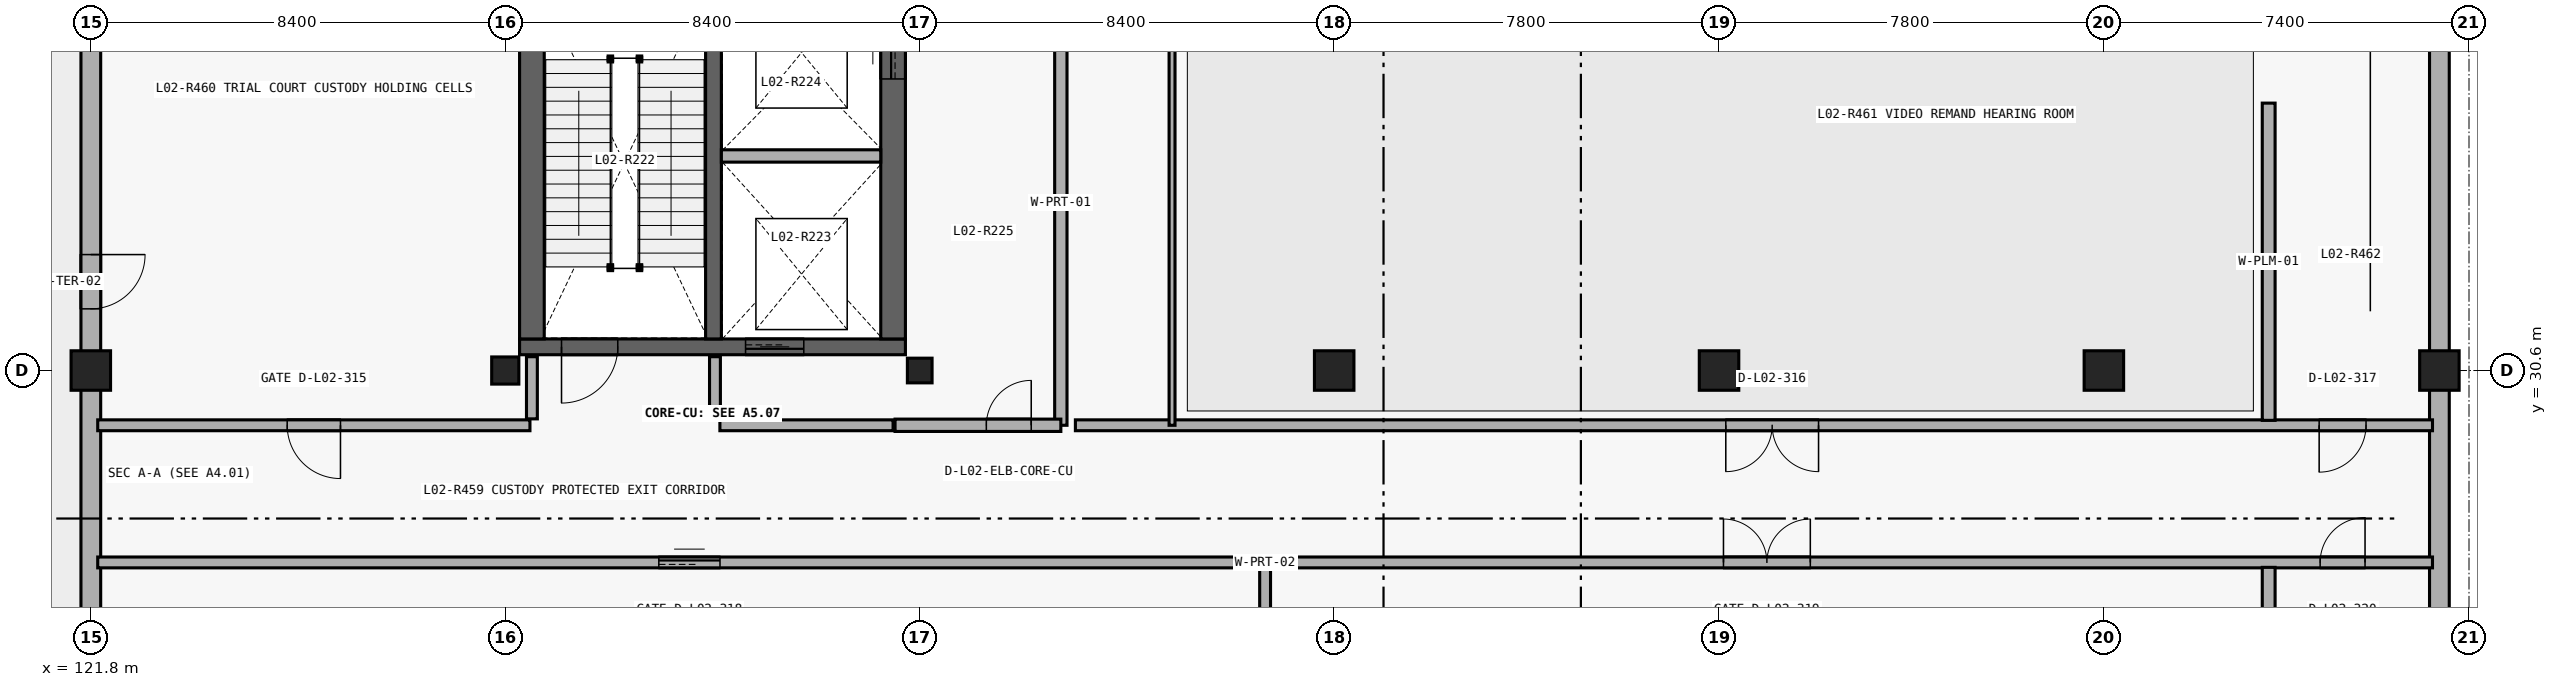
"""IFC4 building model, lengths in metres.
Left out: names, types, materials, properties, quantities, classifications, styles, units other than length and angle.
Written with IfcOpenShell. Run it as: python <this file> out.ifc"""

import sys

from ifc_helpers import new_model, si_unit, direction, frame, frame_2d, origin_with_axes, origin_2d_with_axis, place, context, subcontext, project, spatial, rectangle, circle, i_section, extrude, element, fill, save


model = new_model("IFC4")
c1 = context("Model", 3, precision=1e-05, world=origin_with_axes(), true_north=direction((0.0, 1.0)))
c2 = subcontext(c1, "Body", "Model", "MODEL_VIEW")
j1 = project(units=[si_unit("LENGTHUNIT", "METRE"), si_unit("PLANEANGLEUNIT", "RADIAN")], contexts=[c1])
p1 = place(None, origin_with_axes())
s1 = spatial("IfcSite", under=j1, at=p1, CompositionType="ELEMENT")
p2 = place(p1, origin_with_axes())
s2 = spatial("IfcBuilding", under=s1, at=p2, CompositionType="ELEMENT")
p3 = place(p2, frame((0.0, 0.0, 10.8), z_axis=(0.0, 0.0, 1.0), x_axis=(1.0, 0.0, 0.0)))
s3 = spatial("IfcBuildingStorey", under=s2, at=p3, CompositionType="ELEMENT", Elevation=10.8)
p4 = place(None, frame((169.4, 7.06, 10.8), z_axis=(0.0, 0.0, 1.0), x_axis=(0.0, 1.0, 0.0)))
e1 = element("IfcWall", 1, at=p4, inside=s3, PredefinedType="SOLIDWALL", context=c2, shape_type="SweptSolid", body=[
    extrude(rectangle(XDim=47.28, YDim=0.4, at=frame_2d((23.64, 0.0), x_axis=(1.0, 0.0))), origin_with_axes(), (0.0, 0.0, 1.0), 4.124),
])
p5 = place(None, frame((121.8, 54.34, 10.8), z_axis=(0.0, 0.0, 1.0), x_axis=(0.0, -1.0, 0.0)))
e2 = element("IfcWall", 2, at=p5, inside=s3, PredefinedType="SOLIDWALL", context=c2, shape_type="SweptSolid", body=[
    extrude(rectangle(XDim=47.28, YDim=0.4, at=frame_2d((23.64, 0.0), x_axis=(1.0, 0.0))), origin_with_axes(), (0.0, 0.0, 1.0), 4.124),
])
p6 = place(None, frame((121.8, 32.4, 10.8), z_axis=(0.0, 0.0, 1.0), x_axis=(0.0, -1.0, 0.0)))
e3 = element("IfcOpeningElement", 3, at=p6, cuts=e2, PredefinedType="OPENING", context=c2, shape_type="SweptSolid", body=[
    extrude(rectangle(XDim=1.1, YDim=2.3, at=frame_2d((0.0, 1.15), x_axis=(1.0, 0.0))), frame((0.0, 0.21, 0.0), z_axis=(0.0, -1.0, 0.0), x_axis=(1.0, 0.0, 0.0)), (0.0, 0.0, 1.0), 0.42),
])
p7 = place(None, frame((130.49, 31.08, 10.8), z_axis=(0.0, 0.0, 1.0), x_axis=(1.0, 0.0, 0.0)))
e4 = element("IfcWall", 4, at=p7, inside=s3, PredefinedType="SHEAR", context=c2, shape_type="SweptSolid", body=[
    extrude(rectangle(XDim=7.82, YDim=0.32, at=frame_2d((3.91, 0.0), x_axis=(1.0, 0.0))), origin_with_axes(), (0.0, 0.0, 1.0), 4.8),
])
p8 = place(None, frame((131.91, 31.08, 10.8), z_axis=(0.0, 0.0, 1.0), x_axis=(1.0, 0.0, 0.0)))
e5 = element("IfcOpeningElement", 5, at=p8, cuts=e4, PredefinedType="OPENING", context=c2, shape_type="SweptSolid", body=[
    extrude(rectangle(XDim=1.14, YDim=2.18, at=frame_2d((0.0, 1.09), x_axis=(1.0, 0.0))), frame((0.0, 0.17, 0.0), z_axis=(0.0, -1.0, 0.0), x_axis=(1.0, 0.0, 0.0)), (0.0, 0.0, 1.0), 0.34),
])
p9 = place(None, frame((135.66, 31.08, 10.8), z_axis=(0.0, 0.0, 1.0), x_axis=(1.0, 0.0, 0.0)))
e6 = element("IfcOpeningElement", 6, at=p9, cuts=e4, PredefinedType="OPENING", context=c2, shape_type="SweptSolid", body=[
    extrude(rectangle(XDim=1.18, YDim=2.24, at=frame_2d((0.0, 1.12), x_axis=(1.0, 0.0))), frame((0.0, 0.17, 0.0), z_axis=(0.0, -1.0, 0.0), x_axis=(1.0, 0.0, 0.0)), (0.0, 0.0, 1.0), 0.34),
])
p10 = place(None, frame((138.06, 31.24, 10.8), z_axis=(0.0, 0.0, 1.0), x_axis=(0.0, 1.0, 0.0)))
e7 = element("IfcWall", 7, at=p10, inside=s3, PredefinedType="SHEAR", context=c2, shape_type="SweptSolid", body=[
    extrude(rectangle(XDim=7.12, YDim=0.5, at=frame_2d((3.56, 0.0), x_axis=(1.0, 0.0))), origin_with_axes(), (0.0, 0.0, 1.0), 4.8),
])
p11 = place(None, frame((138.06, 37.1, 10.8), z_axis=(0.0, 0.0, 1.0), x_axis=(0.0, 1.0, 0.0)))
e8 = element("IfcOpeningElement", 8, at=p11, cuts=e7, PredefinedType="OPENING", context=c2, shape_type="SweptSolid", body=[
    extrude(rectangle(XDim=1.18, YDim=2.24, at=frame_2d((0.0, 1.12), x_axis=(1.0, 0.0))), frame((0.0, 0.26, 0.0), z_axis=(0.0, -1.0, 0.0), x_axis=(1.0, 0.0, 0.0)), (0.0, 0.0, 1.0), 0.52),
])
p12 = place(None, frame((130.74, 38.36, 10.8), z_axis=(0.0, 0.0, 1.0), x_axis=(0.0, -1.0, 0.0)))
e9 = element("IfcWall", 9, at=p12, inside=s3, PredefinedType="SHEAR", context=c2, shape_type="SweptSolid", body=[
    extrude(rectangle(XDim=7.12, YDim=0.5, at=frame_2d((3.56, 0.0), x_axis=(1.0, 0.0))), origin_with_axes(), (0.0, 0.0, 1.0), 4.8),
])
p13 = place(None, frame((134.42, 31.24, 10.8), z_axis=(0.0, 0.0, 1.0), x_axis=(0.0, 1.0, 0.0)))
e10 = element("IfcWall", 10, at=p13, inside=s3, PredefinedType="SHEAR", context=c2, shape_type="SweptSolid", body=[
    extrude(rectangle(XDim=7.12, YDim=0.32, at=frame_2d((3.56, 0.0), x_axis=(1.0, 0.0))), origin_with_axes(), (0.0, 0.0, 1.0), 4.8),
])
p14 = place(None, frame((134.58, 34.949, 10.8), z_axis=(0.0, 0.0, 1.0), x_axis=(1.0, 0.0, 0.0)))
e11 = element("IfcWall", 11, at=p14, inside=s3, PredefinedType="PARTITIONING", context=c2, shape_type="SweptSolid", body=[
    extrude(rectangle(XDim=3.23, YDim=0.25, at=frame_2d((1.615, 0.0), x_axis=(1.0, 0.0))), origin_with_axes(), (0.0, 0.0, 1.0), 4.44),
])
p15 = place(None, frame((141.46, 29.49, 10.8), z_axis=(0.0, 0.0, 1.0), x_axis=(0.0, 1.0, 0.0)))
e12 = element("IfcWall", 12, at=p15, inside=s3, PredefinedType="PARTITIONING", context=c2, shape_type="SweptSolid", body=[
    extrude(rectangle(XDim=9.03, YDim=0.25, at=frame_2d((4.515, 0.0), x_axis=(1.0, 0.0))), origin_with_axes(), (0.0, 0.0, 1.0), 4.44),
])
p16 = place(None, frame((138.1, 29.49, 10.8), z_axis=(0.0, 0.0, 1.0), x_axis=(1.0, 0.0, 0.0)))
e13 = element("IfcWall", 13, at=p16, inside=s3, PredefinedType="PARTITIONING", context=c2, shape_type="SweptSolid", body=[
    extrude(rectangle(XDim=3.36, YDim=0.25, at=frame_2d((1.68, 0.0), x_axis=(1.0, 0.0))), origin_with_axes(), (0.0, 0.0, 1.0), 4.44),
])
p17 = place(None, frame((140.405, 29.49, 10.8), z_axis=(0.0, 0.0, 1.0), x_axis=(1.0, 0.0, 0.0)))
e14 = element("IfcOpeningElement", 14, at=p17, cuts=e13, PredefinedType="OPENING", context=c2, shape_type="SweptSolid", body=[
    extrude(rectangle(XDim=0.91, YDim=2.12, at=frame_2d((0.0, 1.06), x_axis=(1.0, 0.0))), frame((0.0, 0.135, 0.0), z_axis=(0.0, -1.0, 0.0), x_axis=(1.0, 0.0, 0.0)), (0.0, 0.0, 1.0), 0.27),
])
for number, where, z_axis, x_axis in (
    (15, (130.74, 29.62, 10.8), (0.0, 0.0, 1.0), (0.0, 1.0, 0.0)),
    (16, (134.45, 29.62, 10.8), (0.0, 0.0, 1.0), (0.0, 1.0, 0.0)),
):
    element("IfcWall", number, at=place(None, frame(where, z_axis=z_axis, x_axis=x_axis)), inside=s3, PredefinedType="PARTITIONING", context=c2, shape_type="SweptSolid", body=[
        extrude(rectangle(XDim=1.26, YDim=0.22, at=frame_2d((0.63, 0.0), x_axis=(1.0, 0.0))), origin_with_axes(), (0.0, 0.0, 1.0), 4.44),
    ])
p18 = place(None, frame((121.94, 29.49, 10.8), z_axis=(0.0, 0.0, 1.0), x_axis=(1.0, 0.0, 0.0)))
e17 = element("IfcWall", 17, at=p18, inside=s3, PredefinedType="PARTITIONING", context=c2, shape_type="SweptSolid", body=[
    extrude(rectangle(XDim=8.76, YDim=0.22, at=frame_2d((4.38, 0.0), x_axis=(1.0, 0.0))), origin_with_axes(), (0.0, 0.0, 1.0), 4.44),
])
p19 = place(None, frame((126.32, 29.49, 10.8), z_axis=(0.0, 0.0, 1.0), x_axis=(1.0, 0.0, 0.0)))
e18 = element("IfcOpeningElement", 18, at=p19, cuts=e17, PredefinedType="OPENING", context=c2, shape_type="SweptSolid", body=[
    extrude(rectangle(XDim=1.08, YDim=2.18, at=frame_2d((0.0, 1.09), x_axis=(1.0, 0.0))), frame((0.0, 0.12, 0.0), z_axis=(0.0, -1.0, 0.0), x_axis=(1.0, 0.0, 0.0)), (0.0, 0.0, 1.0), 0.24),
])
p20 = place(None, frame((134.55, 29.49, 10.8), z_axis=(0.0, 0.0, 1.0), x_axis=(1.0, 0.0, 0.0)))
e19 = element("IfcWall", 19, at=p20, inside=s3, PredefinedType="PARTITIONING", context=c2, shape_type="SweptSolid", body=[
    extrude(rectangle(XDim=3.51, YDim=0.22, at=frame_2d((1.755, 0.0), x_axis=(1.0, 0.0))), origin_with_axes(), (0.0, 0.0, 1.0), 4.44),
])
p21 = place(None, frame((141.755, 29.49, 10.8), z_axis=(0.0, 0.0, 1.0), x_axis=(1.0, 0.0, 0.0)))
e20 = element("IfcWall", 20, at=p21, inside=s3, PredefinedType="PARTITIONING", context=c2, shape_type="SweptSolid", body=[
    extrude(rectangle(XDim=27.505, YDim=0.22, at=frame_2d((13.752, 0.0), x_axis=(1.0, 0.0))), origin_with_axes(), (0.0, 0.0, 1.0), 4.44),
])
p22 = place(None, frame((155.877, 29.49, 10.8), z_axis=(0.0, 0.0, 1.0), x_axis=(1.0, 0.0, 0.0)))
e21 = element("IfcOpeningElement", 21, at=p22, cuts=e20, PredefinedType="OPENING", context=c2, shape_type="SweptSolid", body=[
    extrude(rectangle(XDim=1.88, YDim=2.56, at=frame_2d((0.0, 1.28), x_axis=(1.0, 0.0))), frame((0.0, 0.12, 0.0), z_axis=(0.0, -1.0, 0.0), x_axis=(1.0, 0.0, 0.0)), (0.0, 0.0, 1.0), 0.24),
])
p23 = place(None, frame((167.438, 29.49, 10.8), z_axis=(0.0, 0.0, 1.0), x_axis=(1.0, 0.0, 0.0)))
e22 = element("IfcOpeningElement", 22, at=p23, cuts=e20, PredefinedType="OPENING", context=c2, shape_type="SweptSolid", body=[
    extrude(rectangle(XDim=0.95, YDim=2.1, at=frame_2d((0.0, 1.05), x_axis=(1.0, 0.0))), frame((0.0, 0.12, 0.0), z_axis=(0.0, -1.0, 0.0), x_axis=(1.0, 0.0, 0.0)), (0.0, 0.0, 1.0), 0.24),
])
p24 = place(None, frame((121.94, 26.71, 10.8), z_axis=(0.0, 0.0, 1.0), x_axis=(1.0, 0.0, 0.0)))
e23 = element("IfcWall", 23, at=p24, inside=s3, PredefinedType="PARTITIONING", context=c2, shape_type="SweptSolid", body=[
    extrude(rectangle(XDim=47.32, YDim=0.22, at=frame_2d((23.66, 0.0), x_axis=(1.0, 0.0))), origin_with_axes(), (0.0, 0.0, 1.0), 4.44),
])
p25 = place(None, frame((133.932, 26.71, 10.8), z_axis=(0.0, 0.0, 1.0), x_axis=(1.0, 0.0, 0.0)))
e24 = element("IfcOpeningElement", 24, at=p25, cuts=e23, PredefinedType="OPENING", context=c2, shape_type="SweptSolid", body=[
    extrude(rectangle(XDim=1.24, YDim=2.22, at=frame_2d((0.0, 1.11), x_axis=(1.0, 0.0))), frame((0.0, 0.12, 0.0), z_axis=(0.0, -1.0, 0.0), x_axis=(1.0, 0.0, 0.0)), (0.0, 0.0, 1.0), 0.24),
])
p26 = place(None, frame((155.77, 26.71, 10.8), z_axis=(0.0, 0.0, 1.0), x_axis=(1.0, 0.0, 0.0)))
e25 = element("IfcOpeningElement", 25, at=p26, cuts=e23, PredefinedType="OPENING", context=c2, shape_type="SweptSolid", body=[
    extrude(rectangle(XDim=1.76, YDim=2.26, at=frame_2d((0.0, 1.13), x_axis=(1.0, 0.0))), frame((0.0, 0.12, 0.0), z_axis=(0.0, -1.0, 0.0), x_axis=(1.0, 0.0, 0.0)), (0.0, 0.0, 1.0), 0.24),
])
p27 = place(None, frame((167.438, 26.71, 10.8), z_axis=(0.0, 0.0, 1.0), x_axis=(1.0, 0.0, 0.0)))
e26 = element("IfcOpeningElement", 26, at=p27, cuts=e23, PredefinedType="OPENING", context=c2, shape_type="SweptSolid", body=[
    extrude(rectangle(XDim=0.91, YDim=2.12, at=frame_2d((0.0, 1.06), x_axis=(1.0, 0.0))), frame((0.0, 0.12, 0.0), z_axis=(0.0, -1.0, 0.0), x_axis=(1.0, 0.0, 0.0)), (0.0, 0.0, 1.0), 0.24),
])
p28 = place(None, frame((165.94, 29.59, 10.8), z_axis=(0.0, 0.0, 1.0), x_axis=(0.0, 1.0, 0.0)))
e27 = element("IfcWall", 27, at=p28, inside=s3, PredefinedType="PLUMBINGWALL", context=c2, shape_type="SweptSolid", body=[
    extrude(rectangle(XDim=6.43, YDim=0.26, at=frame_2d((3.215, 0.0), x_axis=(1.0, 0.0))), origin_with_axes(), (0.0, 0.0, 1.0), 4.44),
])
p29 = place(None, frame((165.94, 20.18, 10.8), z_axis=(0.0, 0.0, 1.0), x_axis=(0.0, 1.0, 0.0)))
e28 = element("IfcWall", 28, at=p29, inside=s3, PredefinedType="PLUMBINGWALL", context=c2, shape_type="SweptSolid", body=[
    extrude(rectangle(XDim=6.43, YDim=0.26, at=frame_2d((3.215, 0.0), x_axis=(1.0, 0.0))), origin_with_axes(), (0.0, 0.0, 1.0), 4.44),
])
p30 = place(None, frame((143.714, 29.49, 10.8), z_axis=(0.0, 0.0, 1.0), x_axis=(0.0, 1.0, 0.0)))
e29 = element("IfcWall", 29, at=p30, inside=s3, PredefinedType="PARTITIONING", context=c2, shape_type="SweptSolid", body=[
    extrude(rectangle(XDim=24.97, YDim=0.12, at=frame_2d((12.485, 0.0), x_axis=(1.0, 0.0))), origin_with_axes(), (0.0, 0.0, 1.0), 4.44),
])
p31 = place(None, frame((145.6, 6.94, 10.8), z_axis=(0.0, 0.0, 1.0), x_axis=(0.0, 1.0, 0.0)))
e30 = element("IfcWall", 30, at=p31, inside=s3, PredefinedType="PARTITIONING", context=c2, shape_type="SweptSolid", body=[
    extrude(rectangle(XDim=19.77, YDim=0.22, at=frame_2d((9.885, 0.0), x_axis=(1.0, 0.0))), origin_with_axes(), (0.0, 0.0, 1.0), 4.44),
])
p32 = place(None, frame((121.8, 30.6, 10.8), z_axis=(0.0, 0.0, 1.0), x_axis=(1.0, 0.0, 0.0)))
e31 = element("IfcColumn", 31, at=p32, inside=s3, PredefinedType="COLUMN", context=c2, shape_type="SweptSolid", body=[
    extrude(circle(Radius=0.4, at=origin_2d_with_axis()), origin_with_axes(), (0.0, 0.0, 1.0), 4.8),
])
p33 = place(None, frame((130.2, 30.6, 10.8), z_axis=(0.0, 0.0, 1.0), x_axis=(1.0, 0.0, 0.0)))
e32 = element("IfcColumn", 32, at=p33, inside=s3, PredefinedType="COLUMN", context=c2, shape_type="SweptSolid", body=[
    extrude(i_section(OverallWidth=0.55, OverallDepth=0.55, WebThickness=0.025, FlangeThickness=0.042, at=origin_2d_with_axis()), origin_with_axes(), (0.0, 0.0, 1.0), 4.8),
])
p34 = place(None, frame((138.6, 30.6, 10.8), z_axis=(0.0, 0.0, 1.0), x_axis=(1.0, 0.0, 0.0)))
e33 = element("IfcColumn", 33, at=p34, inside=s3, PredefinedType="COLUMN", context=c2, shape_type="SweptSolid", body=[
    extrude(i_section(OverallWidth=0.5, OverallDepth=0.5, WebThickness=0.022, FlangeThickness=0.036, at=origin_2d_with_axis()), origin_with_axes(), (0.0, 0.0, 1.0), 4.8),
])
for number, where, z_axis, x_axis in (
    (34, (147.0, 30.6, 10.8), (0.0, 0.0, 1.0), (1.0, 0.0, 0.0)),
    (35, (154.8, 30.6, 10.8), (0.0, 0.0, 1.0), (1.0, 0.0, 0.0)),
    (36, (162.6, 30.6, 10.8), (0.0, 0.0, 1.0), (1.0, 0.0, 0.0)),
):
    element("IfcColumn", number, at=place(None, frame(where, z_axis=z_axis, x_axis=x_axis)), inside=s3, PredefinedType="COLUMN", context=c2, shape_type="SweptSolid", body=[
        extrude(rectangle(XDim=0.8, YDim=0.8, at=origin_2d_with_axis()), origin_with_axes(), (0.0, 0.0, 1.0), 4.8),
    ])
p35 = place(None, frame((169.4, 30.6, 10.8), z_axis=(0.0, 0.0, 1.0), x_axis=(1.0, 0.0, 0.0)))
e37 = element("IfcColumn", 37, at=p35, inside=s3, PredefinedType="COLUMN", context=c2, shape_type="SweptSolid", body=[
    extrude(circle(Radius=0.4, at=origin_2d_with_axis()), origin_with_axes(), (0.0, 0.0, 1.0), 4.8),
])
p36 = place(None, frame((121.8, 32.4, 10.8), z_axis=(0.0, 0.0, 1.0), x_axis=(0.0, -1.0, 0.0)))
e38 = element("IfcDoor", 38, at=p36, inside=s3, OperationType="SINGLE_SWING_LEFT", PredefinedType="DOOR", context=c2, shape_type="SweptSolid", body=[
    extrude(rectangle(XDim=1.1, YDim=2.3, at=frame_2d((0.0, 1.15), x_axis=(1.0, 0.0))), frame((0.0, 0.04, 0.0), z_axis=(0.0, -1.0, 0.0), x_axis=(1.0, 0.0, 0.0)), (0.0, 0.0, 1.0), 0.08),
])
fill(e3, e38)
p37 = place(None, frame((131.91, 31.08, 10.8), z_axis=(0.0, 0.0, 1.0), x_axis=(-1.0, 0.0, 0.0)))
e39 = element("IfcDoor", 39, at=p37, inside=s3, OperationType="SINGLE_SWING_LEFT", PredefinedType="DOOR", context=c2, shape_type="SweptSolid", body=[
    extrude(rectangle(XDim=1.14, YDim=2.18, at=frame_2d((0.0, 1.09), x_axis=(1.0, 0.0))), frame((0.0, 0.04, 0.0), z_axis=(0.0, -1.0, 0.0), x_axis=(1.0, 0.0, 0.0)), (0.0, 0.0, 1.0), 0.08),
])
fill(e5, e39)
p38 = place(None, frame((135.66, 31.08, 10.8), z_axis=(0.0, 0.0, 1.0), x_axis=(-1.0, 0.0, 0.0)))
e40 = element("IfcDoor", 40, at=p38, inside=s3, OperationType="SLIDING_TO_LEFT", PredefinedType="DOOR", context=c2, shape_type="SweptSolid", body=[
    extrude(rectangle(XDim=1.18, YDim=2.24, at=frame_2d((0.0, 1.12), x_axis=(1.0, 0.0))), frame((0.0, 0.04, 0.0), z_axis=(0.0, -1.0, 0.0), x_axis=(1.0, 0.0, 0.0)), (0.0, 0.0, 1.0), 0.08),
])
fill(e6, e40)
p39 = place(None, frame((138.06, 37.1, 10.8), z_axis=(0.0, 0.0, 1.0), x_axis=(0.0, 1.0, 0.0)))
e41 = element("IfcDoor", 41, at=p39, inside=s3, OperationType="SLIDING_TO_LEFT", PredefinedType="DOOR", context=c2, shape_type="SweptSolid", body=[
    extrude(rectangle(XDim=1.18, YDim=2.24, at=frame_2d((0.0, 1.12), x_axis=(1.0, 0.0))), frame((0.0, 0.04, 0.0), z_axis=(0.0, -1.0, 0.0), x_axis=(1.0, 0.0, 0.0)), (0.0, 0.0, 1.0), 0.08),
])
fill(e8, e41)
p40 = place(None, frame((140.405, 29.49, 10.8), z_axis=(0.0, 0.0, 1.0), x_axis=(1.0, 0.0, 0.0)))
e42 = element("IfcDoor", 42, at=p40, inside=s3, OperationType="SINGLE_SWING_RIGHT", PredefinedType="DOOR", context=c2, shape_type="SweptSolid", body=[
    extrude(rectangle(XDim=0.91, YDim=2.12, at=frame_2d((0.0, 1.06), x_axis=(1.0, 0.0))), frame((0.0, 0.04, 0.0), z_axis=(0.0, -1.0, 0.0), x_axis=(1.0, 0.0, 0.0)), (0.0, 0.0, 1.0), 0.08),
])
fill(e14, e42)
p41 = place(None, frame((126.32, 29.49, 10.8), z_axis=(0.0, 0.0, 1.0), x_axis=(-1.0, 0.0, 0.0)))
e43 = element("IfcDoor", 43, at=p41, inside=s3, OperationType="SINGLE_SWING_RIGHT", PredefinedType="GATE", context=c2, shape_type="SweptSolid", body=[
    extrude(rectangle(XDim=1.08, YDim=2.18, at=frame_2d((0.0, 1.09), x_axis=(1.0, 0.0))), frame((0.0, 0.04, 0.0), z_axis=(0.0, -1.0, 0.0), x_axis=(1.0, 0.0, 0.0)), (0.0, 0.0, 1.0), 0.08),
])
fill(e18, e43)
p42 = place(None, frame((155.877, 29.49, 10.8), z_axis=(0.0, 0.0, 1.0), x_axis=(-1.0, 0.0, 0.0)))
e44 = element("IfcDoor", 44, at=p42, inside=s3, OperationType="DOUBLE_DOOR_SINGLE_SWING", PredefinedType="DOOR", context=c2, shape_type="SweptSolid", body=[
    extrude(rectangle(XDim=1.88, YDim=2.56, at=frame_2d((0.0, 1.28), x_axis=(1.0, 0.0))), frame((0.0, 0.04, 0.0), z_axis=(0.0, -1.0, 0.0), x_axis=(1.0, 0.0, 0.0)), (0.0, 0.0, 1.0), 0.08),
])
fill(e21, e44)
p43 = place(None, frame((167.438, 29.49, 10.8), z_axis=(0.0, 0.0, 1.0), x_axis=(-1.0, 0.0, 0.0)))
e45 = element("IfcDoor", 45, at=p43, inside=s3, OperationType="SINGLE_SWING_LEFT", PredefinedType="DOOR", context=c2, shape_type="SweptSolid", body=[
    extrude(rectangle(XDim=0.95, YDim=2.1, at=frame_2d((0.0, 1.05), x_axis=(1.0, 0.0))), frame((0.0, 0.04, 0.0), z_axis=(0.0, -1.0, 0.0), x_axis=(1.0, 0.0, 0.0)), (0.0, 0.0, 1.0), 0.08),
])
fill(e22, e45)
p44 = place(None, frame((133.932, 26.71, 10.8), z_axis=(0.0, 0.0, 1.0), x_axis=(1.0, 0.0, 0.0)))
e46 = element("IfcDoor", 46, at=p44, inside=s3, OperationType="SLIDING_TO_LEFT", PredefinedType="GATE", context=c2, shape_type="SweptSolid", body=[
    extrude(rectangle(XDim=1.24, YDim=2.22, at=frame_2d((0.0, 1.11), x_axis=(1.0, 0.0))), frame((0.0, 0.04, 0.0), z_axis=(0.0, -1.0, 0.0), x_axis=(1.0, 0.0, 0.0)), (0.0, 0.0, 1.0), 0.08),
])
fill(e24, e46)
p45 = place(None, frame((155.77, 26.71, 10.8), z_axis=(0.0, 0.0, 1.0), x_axis=(1.0, 0.0, 0.0)))
e47 = element("IfcDoor", 47, at=p45, inside=s3, OperationType="DOUBLE_DOOR_SINGLE_SWING", PredefinedType="GATE", context=c2, shape_type="SweptSolid", body=[
    extrude(rectangle(XDim=1.76, YDim=2.26, at=frame_2d((0.0, 1.13), x_axis=(1.0, 0.0))), frame((0.0, 0.04, 0.0), z_axis=(0.0, -1.0, 0.0), x_axis=(1.0, 0.0, 0.0)), (0.0, 0.0, 1.0), 0.08),
])
fill(e25, e47)
p46 = place(None, frame((167.438, 26.71, 10.8), z_axis=(0.0, 0.0, 1.0), x_axis=(1.0, 0.0, 0.0)))
e48 = element("IfcDoor", 48, at=p46, inside=s3, OperationType="SINGLE_SWING_RIGHT", PredefinedType="DOOR", context=c2, shape_type="SweptSolid", body=[
    extrude(rectangle(XDim=0.91, YDim=2.12, at=frame_2d((0.0, 1.06), x_axis=(1.0, 0.0))), frame((0.0, 0.04, 0.0), z_axis=(0.0, -1.0, 0.0), x_axis=(1.0, 0.0, 0.0)), (0.0, 0.0, 1.0), 0.08),
])
fill(e26, e48)
save(model, sys.argv[1])
